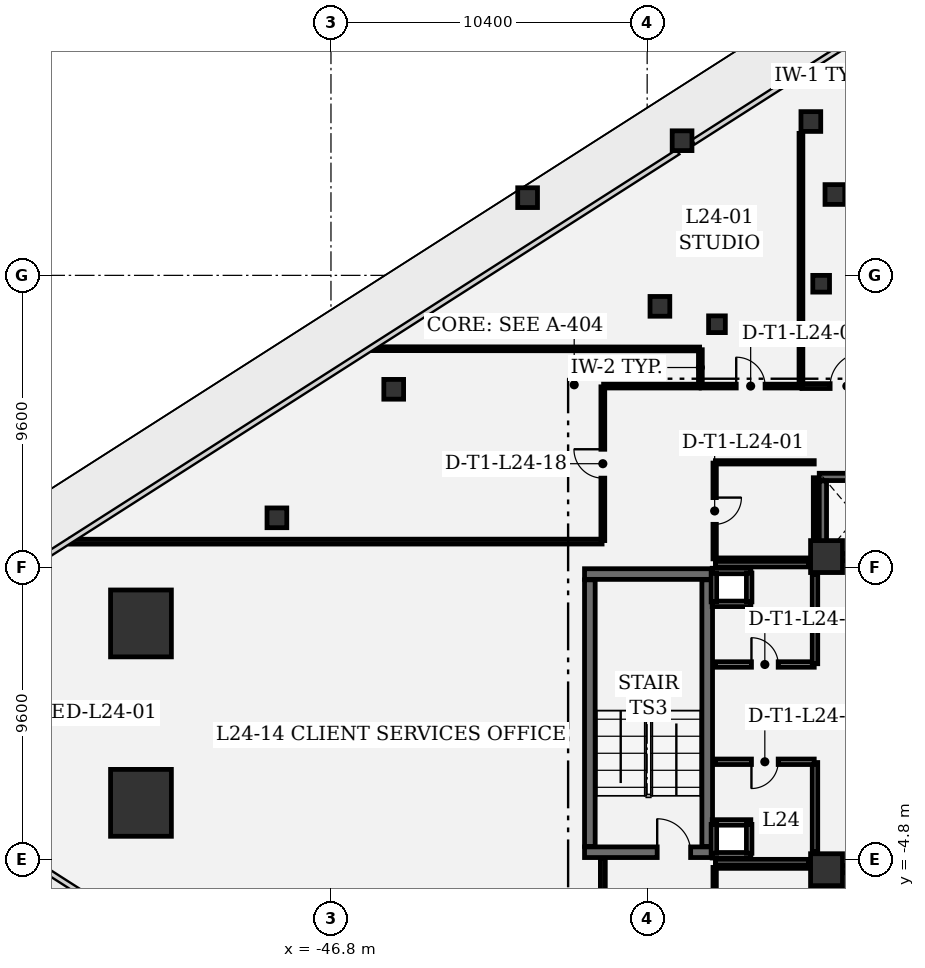
"""IFC4 building model, lengths in metres.
Left out: names, types, materials, properties, quantities, classifications, styles, units other than length and angle.
Written with IfcOpenShell. Run it as: python <this file> out.ifc"""

import sys

from ifc_helpers import new_model, si_unit, direction, frame, frame_2d, origin, origin_2d, place, context, subcontext, project, spatial, rectangle, extrude, element, fill, save


model = new_model("IFC4")
c1 = context("Model", 3, precision=1e-05, world=origin(), true_north=direction((0.0, 1.0)))
c2 = subcontext(c1, "Body", "Model", "MODEL_VIEW")
j1 = project(units=[si_unit("LENGTHUNIT", "METRE"), si_unit("PLANEANGLEUNIT", "RADIAN")], contexts=[c1])
p1 = place(None, origin())
s1 = spatial("IfcSite", under=j1, at=p1, CompositionType="ELEMENT")
p2 = place(p1, origin())
s2 = spatial("IfcBuilding", under=s1, at=p2, CompositionType="ELEMENT")
p3 = place(p2, frame((0.0, 0.0, 109.8)))
s3 = spatial("IfcBuildingStorey", under=s2, at=p3, CompositionType="ELEMENT", Elevation=109.8)
for number, where, z_axis, x_axis in (
    (1, (-53.049, 2.951, 0.0), (0.0, 0.0, 1.0), (1.0, 0.0, 0.0)),
    (2, (-53.049, -2.951, 0.0), (0.0, 0.0, 1.0), (1.0, 0.0, 0.0)),
):
    element("IfcColumn", number, at=place(p3, frame(where, z_axis=z_axis, x_axis=x_axis)), inside=s3, PredefinedType="COLUMN", context=c2, shape_type="SweptSolid", body=[
        extrude(rectangle(XDim=2.0, YDim=2.2, at=origin_2d()), origin(), (0.0, 0.0, 1.0), 4.05),
    ])
for number, where, z_axis, x_axis in (
    (3, (-30.5, 5.15, 0.0), (0.0, 0.0, 1.0), (1.0, 0.0, 0.0)),
    (4, (-30.5, -5.15, 0.0), (0.0, 0.0, 1.0), (1.0, 0.0, 0.0)),
):
    element("IfcColumn", number, at=place(p3, frame(where, z_axis=z_axis, x_axis=x_axis)), inside=s3, PredefinedType="COLUMN", context=c2, shape_type="SweptSolid", body=[
        extrude(rectangle(XDim=1.05, YDim=1.05, at=origin_2d()), origin(), (0.0, 0.0, 1.0), 4.05),
    ])
for number, where, z_axis, x_axis in (
    (5, (-40.333, 16.956, 0.0), (0.0, 0.0, 1.0), (1.0, 0.0, 0.0)),
    (6, (-35.252, 18.829, 0.0), (0.0, 0.0, 1.0), (1.0, 0.0, 0.0)),
    (7, (-31.016, 19.46, 0.0), (0.0, 0.0, 1.0), (1.0, 0.0, 0.0)),
    (8, (-44.736, 10.652, 0.0), (0.0, 0.0, 1.0), (1.0, 0.0, 0.0)),
    (9, (-48.578, 6.425, 0.0), (0.0, 0.0, 1.0), (1.0, 0.0, 0.0)),
    (10, (-35.981, 13.381, 0.0), (0.0, 0.0, 1.0), (1.0, 0.0, 0.0)),
    (11, (-30.225, 17.06, 0.0), (0.0, 0.0, 1.0), (1.0, 0.0, 0.0)),
):
    element("IfcColumn", number, at=place(p3, frame(where, z_axis=z_axis, x_axis=x_axis)), inside=s3, PredefinedType="COLUMN", context=c2, shape_type="SweptSolid", body=[
        extrude(rectangle(XDim=0.65, YDim=0.65, at=origin_2d()), origin(), (0.0, 0.0, 1.0), 4.05),
    ])
for number, where, z_axis, x_axis in (
    (12, (-34.104, 12.792, 0.0), (0.0, 0.0, 1.0), (1.0, 0.0, 0.0)),
    (13, (-30.677, 14.124, 0.0), (0.0, 0.0, 1.0), (1.0, 0.0, 0.0)),
):
    element("IfcColumn", number, at=place(p3, frame(where, z_axis=z_axis, x_axis=x_axis)), inside=s3, PredefinedType="COLUMN", context=c2, shape_type="SweptSolid", body=[
        extrude(rectangle(XDim=0.55, YDim=0.55, at=origin_2d()), origin(), (0.0, 0.0, 1.0), 4.05),
    ])
p4 = place(p3, frame((-38.46, -4.575, 0.0), z_axis=(0.0, 0.0, 1.0), x_axis=(1.0, 0.0, 0.0)))
e14 = element("IfcWall", 14, at=p4, inside=s3, PredefinedType="SHEAR", context=c2, shape_type="SweptSolid", body=[
    extrude(rectangle(XDim=4.21, YDim=0.35, at=frame_2d((2.105, 0.0))), origin(), (0.0, 0.0, 1.0), 3.77),
])
p5 = place(p4, frame((2.39, 0.0, 0.0)))
e15 = element("IfcOpeningElement", 15, at=p5, cuts=e14, PredefinedType="OPENING", context=c2, shape_type="SweptSolid", body=[
    extrude(rectangle(XDim=1.1, YDim=2.2, at=frame_2d((0.55, 1.1))), frame((0.0, 0.185, 0.0), z_axis=(0.0, -1.0, 0.0), x_axis=(1.0, 0.0, 0.0)), (0.0, 0.0, 1.0), 0.37),
])
p6 = place(p3, frame((-34.25, 4.575, 0.0), z_axis=(0.0, 0.0, 1.0), x_axis=(-1.0, 0.0, 0.0)))
e16 = element("IfcWall", 16, at=p6, inside=s3, PredefinedType="SHEAR", context=c2, shape_type="SweptSolid", body=[
    extrude(rectangle(XDim=4.21, YDim=0.35, at=frame_2d((2.105, 0.0))), origin(), (0.0, 0.0, 1.0), 3.77),
])
for number, where, z_axis, x_axis in (
    (17, (-34.425, -4.385, 0.0), (0.0, 0.0, 1.0), (0.0, 1.0, 0.0)),
    (18, (-38.285, 4.385, 0.0), (0.0, 0.0, 1.0), (0.0, -1.0, 0.0)),
):
    element("IfcWall", number, at=place(p3, frame(where, z_axis=z_axis, x_axis=x_axis)), inside=s3, PredefinedType="SHEAR", context=c2, shape_type="SweptSolid", body=[
        extrude(rectangle(XDim=8.77, YDim=0.35, at=frame_2d((4.385, 0.0))), origin(), (0.0, 0.0, 1.0), 3.77),
    ])
for number, where, z_axis, x_axis in (
    (19, (-28.26, 5.13, 0.0), (0.0, 0.0, 1.0), (-1.0, 0.0, 0.0)),
    (20, (-30.74, 7.77, 0.0), (0.0, 0.0, 1.0), (1.0, 0.0, 0.0)),
):
    element("IfcWall", number, at=place(p3, frame(where, z_axis=z_axis, x_axis=x_axis)), inside=s3, PredefinedType="SHEAR", context=c2, shape_type="SweptSolid", body=[
        extrude(rectangle(XDim=2.48, YDim=0.24, at=frame_2d((1.24, 0.0))), origin(), (0.0, 0.0, 1.0), 3.77),
    ])
p7 = place(p3, frame((-30.62, 5.262, 0.0), z_axis=(0.0, 0.0, 1.0), x_axis=(0.0, 1.0, 0.0)))
e21 = element("IfcWall", 21, at=p7, inside=s3, PredefinedType="SHEAR", context=c2, shape_type="SweptSolid", body=[
    extrude(rectangle(XDim=2.376, YDim=0.24, at=frame_2d((1.188, 0.0))), origin(), (0.0, 0.0, 1.0), 3.77),
])
p8 = place(p3, frame((-30.74, -5.13, 0.0), z_axis=(0.0, 0.0, 1.0), x_axis=(1.0, 0.0, 0.0)))
e22 = element("IfcWall", 22, at=p8, inside=s3, PredefinedType="SHEAR", context=c2, shape_type="SweptSolid", body=[
    extrude(rectangle(XDim=2.48, YDim=0.24, at=frame_2d((1.24, 0.0))), origin(), (0.0, 0.0, 1.0), 3.77),
])
p9 = place(p3, frame((-30.62, -7.638, 0.0), z_axis=(0.0, 0.0, 1.0), x_axis=(0.0, 1.0, 0.0)))
e23 = element("IfcWall", 23, at=p9, inside=s3, PredefinedType="SHEAR", context=c2, shape_type="SweptSolid", body=[
    extrude(rectangle(XDim=2.376, YDim=0.24, at=frame_2d((1.188, 0.0))), origin(), (0.0, 0.0, 1.0), 3.77),
])
for number, where, z_axis, x_axis in (
    (24, (-32.99, 3.595, 0.0), (0.0, 0.0, 1.0), (-1.0, 0.0, 0.0)),
    (25, (-34.26, 4.675, 0.0), (0.0, 0.0, 1.0), (1.0, 0.0, 0.0)),
):
    element("IfcWall", number, at=place(p3, frame(where, z_axis=z_axis, x_axis=x_axis)), inside=s3, PredefinedType="PARTITIONING", context=c2, shape_type="SweptSolid", body=[
        extrude(rectangle(XDim=1.27, YDim=0.18, at=frame_2d((0.635, 0.0))), origin(), (0.0, 0.0, 1.0), 3.77),
    ])
for number, where, z_axis, x_axis in (
    (26, (-34.205, 3.66, 0.0), (0.0, 0.0, 1.0), (0.0, 1.0, 0.0)),
    (27, (-33.045, 4.61, 0.0), (0.0, 0.0, 1.0), (0.0, -1.0, 0.0)),
):
    element("IfcWall", number, at=place(p3, frame(where, z_axis=z_axis, x_axis=x_axis)), inside=s3, PredefinedType="PARTITIONING", context=c2, shape_type="SweptSolid", body=[
        extrude(rectangle(XDim=0.95, YDim=0.18, at=frame_2d((0.475, 0.0))), origin(), (0.0, 0.0, 1.0), 3.77),
    ])
for number, where, z_axis, x_axis in (
    (28, (-32.99, -4.675, 0.0), (0.0, 0.0, 1.0), (-1.0, 0.0, 0.0)),
    (29, (-34.26, -3.595, 0.0), (0.0, 0.0, 1.0), (1.0, 0.0, 0.0)),
):
    element("IfcWall", number, at=place(p3, frame(where, z_axis=z_axis, x_axis=x_axis)), inside=s3, PredefinedType="PARTITIONING", context=c2, shape_type="SweptSolid", body=[
        extrude(rectangle(XDim=1.27, YDim=0.18, at=frame_2d((0.635, 0.0))), origin(), (0.0, 0.0, 1.0), 3.77),
    ])
for number, where, z_axis, x_axis in (
    (30, (-34.205, -4.61, 0.0), (0.0, 0.0, 1.0), (0.0, 1.0, 0.0)),
    (31, (-33.045, -3.66, 0.0), (0.0, 0.0, 1.0), (0.0, -1.0, 0.0)),
):
    element("IfcWall", number, at=place(p3, frame(where, z_axis=z_axis, x_axis=x_axis)), inside=s3, PredefinedType="PARTITIONING", context=c2, shape_type="SweptSolid", body=[
        extrude(rectangle(XDim=0.95, YDim=0.18, at=frame_2d((0.475, 0.0))), origin(), (0.0, 0.0, 1.0), 3.77),
    ])
p10 = place(p3, frame((-34.18, 8.225, 0.0), z_axis=(0.0, 0.0, 1.0), x_axis=(0.0, -1.0, 0.0)))
e32 = element("IfcWall", 32, at=p10, inside=s3, PredefinedType="PARTITIONING", context=c2, shape_type="SweptSolid", body=[
    extrude(rectangle(XDim=3.15, YDim=0.11, at=frame_2d((1.575, 0.0))), origin(), (0.0, 0.0, 1.0), 3.77),
])
p11 = place(p10, frame((1.135, 0.0, 0.0)))
e33 = element("IfcOpeningElement", 33, at=p11, cuts=e32, PredefinedType="OPENING", context=c2, shape_type="SweptSolid", body=[
    extrude(rectangle(XDim=0.88, YDim=2.1, at=frame_2d((0.44, 1.05))), frame((0.0, 0.065, 0.0), z_axis=(0.0, -1.0, 0.0), x_axis=(1.0, 0.0, 0.0)), (0.0, 0.0, 1.0), 0.13),
])
p12 = place(p3, frame((-34.155, 5.05, 0.0), z_axis=(0.0, 0.0, 1.0), x_axis=(1.0, 0.0, 0.0)))
e34 = element("IfcWall", 34, at=p12, inside=s3, PredefinedType="PARTITIONING", context=c2, shape_type="SweptSolid", body=[
    extrude(rectangle(XDim=3.065, YDim=0.11, at=frame_2d((1.532, 0.0))), origin(), (0.0, 0.0, 1.0), 3.77),
])
p13 = place(p3, frame((-30.88, 5.74, 0.0), z_axis=(0.0, 0.0, 1.0), x_axis=(0.0, 1.0, 0.0)))
e35 = element("IfcWall", 35, at=p13, inside=s3, PredefinedType="PARTITIONING", context=c2, shape_type="SweptSolid", body=[
    extrude(rectangle(XDim=2.003, YDim=0.11, at=frame_2d((1.001, 0.0))), origin(), (0.0, 0.0, 1.0), 3.77),
])
p14 = place(p3, frame((-30.905, 8.25, 0.0), z_axis=(0.0, 0.0, 1.0), x_axis=(-1.0, 0.0, 0.0)))
e36 = element("IfcWall", 36, at=p14, inside=s3, PredefinedType="PARTITIONING", context=c2, shape_type="SweptSolid", body=[
    extrude(rectangle(XDim=3.25, YDim=0.11, at=frame_2d((1.625, 0.0))), origin(), (0.0, 0.0, 1.0), 3.77),
])
p15 = place(p3, frame((-30.88, -7.743, 0.0), z_axis=(0.0, 0.0, 1.0), x_axis=(0.0, 1.0, 0.0)))
e37 = element("IfcWall", 37, at=p15, inside=s3, PredefinedType="PARTITIONING", context=c2, shape_type="SweptSolid", body=[
    extrude(rectangle(XDim=2.003, YDim=0.11, at=frame_2d((1.001, 0.0))), origin(), (0.0, 0.0, 1.0), 3.77),
])
p16 = place(p3, frame((-31.09, -5.05, 0.0), z_axis=(0.0, 0.0, 1.0), x_axis=(-1.0, 0.0, 0.0)))
e38 = element("IfcWall", 38, at=p16, inside=s3, PredefinedType="PARTITIONING", context=c2, shape_type="SweptSolid", body=[
    extrude(rectangle(XDim=3.065, YDim=0.11, at=frame_2d((1.532, 0.0))), origin(), (0.0, 0.0, 1.0), 3.77),
])
p17 = place(p3, frame((-34.18, -5.075, 0.0), z_axis=(0.0, 0.0, 1.0), x_axis=(0.0, -1.0, 0.0)))
e39 = element("IfcWall", 39, at=p17, inside=s3, PredefinedType="PARTITIONING", context=c2, shape_type="SweptSolid", body=[
    extrude(rectangle(XDim=3.25, YDim=0.11, at=frame_2d((1.625, 0.0))), origin(), (0.0, 0.0, 1.0), 3.77),
])
p18 = place(p17, frame((1.185, 0.0, 0.0)))
e40 = element("IfcOpeningElement", 40, at=p18, cuts=e39, PredefinedType="OPENING", context=c2, shape_type="SweptSolid", body=[
    extrude(rectangle(XDim=0.88, YDim=2.1, at=frame_2d((0.44, 1.05))), frame((0.0, 0.065, 0.0), z_axis=(0.0, -1.0, 0.0), x_axis=(1.0, 0.0, 0.0)), (0.0, 0.0, 1.0), 0.13),
])
p19 = place(p3, frame((-34.155, 1.6, 0.0), z_axis=(0.0, 0.0, 1.0), x_axis=(1.0, 0.0, 0.0)))
e41 = element("IfcWall", 41, at=p19, inside=s3, PredefinedType="PARTITIONING", context=c2, shape_type="SweptSolid", body=[
    extrude(rectangle(XDim=3.25, YDim=0.18, at=frame_2d((1.625, 0.0))), origin(), (0.0, 0.0, 1.0), 3.77),
])
p20 = place(p19, frame((1.185, 0.0, 0.0)))
e42 = element("IfcOpeningElement", 42, at=p20, cuts=e41, PredefinedType="OPENING", context=c2, shape_type="SweptSolid", body=[
    extrude(rectangle(XDim=0.88, YDim=2.1, at=frame_2d((0.44, 1.05))), frame((0.0, 0.1, 0.0), z_axis=(0.0, -1.0, 0.0), x_axis=(1.0, 0.0, 0.0)), (0.0, 0.0, 1.0), 0.2),
])
p21 = place(p3, frame((-30.88, 1.625, 0.0), z_axis=(0.0, 0.0, 1.0), x_axis=(0.0, 1.0, 0.0)))
e43 = element("IfcWall", 43, at=p21, inside=s3, PredefinedType="PARTITIONING", context=c2, shape_type="SweptSolid", body=[
    extrude(rectangle(XDim=2.935, YDim=0.18, at=frame_2d((1.468, 0.0))), origin(), (0.0, 0.0, 1.0), 3.77),
])
for number, where, z_axis, x_axis in (
    (44, (-31.09, 4.9, 0.0), (0.0, 0.0, 1.0), (-1.0, 0.0, 0.0)),
    (45, (-34.155, -4.9, 0.0), (0.0, 0.0, 1.0), (1.0, 0.0, 0.0)),
):
    element("IfcWall", number, at=place(p3, frame(where, z_axis=z_axis, x_axis=x_axis)), inside=s3, PredefinedType="PARTITIONING", context=c2, shape_type="SweptSolid", body=[
        extrude(rectangle(XDim=3.065, YDim=0.18, at=frame_2d((1.532, 0.0))), origin(), (0.0, 0.0, 1.0), 3.77),
    ])
p22 = place(p3, frame((-30.88, -4.56, 0.0), z_axis=(0.0, 0.0, 1.0), x_axis=(0.0, 1.0, 0.0)))
e46 = element("IfcWall", 46, at=p22, inside=s3, PredefinedType="PARTITIONING", context=c2, shape_type="SweptSolid", body=[
    extrude(rectangle(XDim=2.935, YDim=0.18, at=frame_2d((1.468, 0.0))), origin(), (0.0, 0.0, 1.0), 3.77),
])
p23 = place(p3, frame((-30.905, -1.6, 0.0), z_axis=(0.0, 0.0, 1.0), x_axis=(-1.0, 0.0, 0.0)))
e47 = element("IfcWall", 47, at=p23, inside=s3, PredefinedType="PARTITIONING", context=c2, shape_type="SweptSolid", body=[
    extrude(rectangle(XDim=3.25, YDim=0.18, at=frame_2d((1.625, 0.0))), origin(), (0.0, 0.0, 1.0), 3.77),
])
p24 = place(p23, frame((1.185, 0.0, 0.0)))
e48 = element("IfcOpeningElement", 48, at=p24, cuts=e47, PredefinedType="OPENING", context=c2, shape_type="SweptSolid", body=[
    extrude(rectangle(XDim=0.88, YDim=2.1, at=frame_2d((0.44, 1.05))), frame((0.0, 0.1, 0.0), z_axis=(0.0, -1.0, 0.0), x_axis=(1.0, 0.0, 0.0)), (0.0, 0.0, 1.0), 0.2),
])
p25 = place(p3, frame((-34.65, 10.783, 0.0), z_axis=(0.0, 0.0, 1.0), x_axis=(0.0, 1.0, 0.0)))
e49 = element("IfcWall", 49, at=p25, inside=s3, PredefinedType="PARTITIONING", context=c2, shape_type="SweptSolid", body=[
    extrude(rectangle(XDim=1.171, YDim=0.125, at=frame_2d((0.585, 0.0))), origin(), (0.0, 0.0, 1.0), 3.77),
])
p26 = place(p3, frame((-34.625, 10.758, 0.0), z_axis=(0.0, 0.0, 1.0), x_axis=(1.0, 0.0, 0.0)))
e50 = element("IfcWall", 50, at=p26, inside=s3, PredefinedType="PARTITIONING", context=c2, shape_type="SweptSolid", body=[
    extrude(rectangle(XDim=3.258, YDim=0.125, at=frame_2d((1.629, 0.0))), origin(), (0.0, 0.0, 1.0), 3.334),
])
p27 = place(p26, frame((1.154, 0.0, 0.0)))
e51 = element("IfcOpeningElement", 51, at=p27, cuts=e50, PredefinedType="OPENING", context=c2, shape_type="SweptSolid", body=[
    extrude(rectangle(XDim=0.95, YDim=2.15, at=frame_2d((0.475, 1.075))), frame((0.0, 0.073, 0.0), z_axis=(0.0, -1.0, 0.0), x_axis=(1.0, 0.0, 0.0)), (0.0, 0.0, 1.0), 0.145),
])
p28 = place(p3, frame((-31.342, 10.783, 0.0), z_axis=(0.0, 0.0, 1.0), x_axis=(0.0, 1.0, 0.0)))
e52 = element("IfcWall", 52, at=p28, inside=s3, PredefinedType="PARTITIONING", context=c2, shape_type="SweptSolid", body=[
    extrude(rectangle(XDim=8.287, YDim=0.125, at=frame_2d((4.144, 0.0))), origin(), (0.0, 0.0, 1.0), 3.77),
])
p29 = place(p3, frame((-45.432, 11.988, 0.0), z_axis=(0.0, 0.0, 1.0), x_axis=(0.999999628081, -0.000862459961, 0.0)))
e53 = element("IfcWall", 53, at=p29, inside=s3, PredefinedType="PARTITIONING", context=c2, shape_type="SweptSolid", body=[
    extrude(rectangle(XDim=10.757, YDim=0.125, at=frame_2d((5.378, 0.0))), origin(), (0.0, 0.0, 1.0), 2.89),
])
p30 = place(p3, frame((-31.309, 10.758, 0.0), z_axis=(0.0, 0.0, 1.0), x_axis=(1.0, 0.0, 0.0)))
e54 = element("IfcWall", 54, at=p30, inside=s3, PredefinedType="PARTITIONING", context=c2, shape_type="SweptSolid", body=[
    extrude(rectangle(XDim=2.952, YDim=0.16, at=frame_2d((1.476, 0.0))), origin(), (0.0, 0.0, 1.0), 3.77),
])
p31 = place(p30, frame((0.926, 0.0, 0.0)))
e55 = element("IfcOpeningElement", 55, at=p31, cuts=e54, PredefinedType="OPENING", context=c2, shape_type="SweptSolid", body=[
    extrude(rectangle(XDim=1.1, YDim=2.15, at=frame_2d((0.55, 1.075))), frame((0.0, 0.09, 0.0), z_axis=(0.0, -1.0, 0.0), x_axis=(1.0, 0.0, 0.0)), (0.0, 0.0, 1.0), 0.18),
])
p32 = place(p3, frame((-37.858, -10.576, 0.0), z_axis=(0.0, 0.0, 1.0), x_axis=(0.0, 1.0, 0.0)))
e56 = element("IfcWall", 56, at=p32, inside=s3, PredefinedType="PARTITIONING", context=c2, shape_type="SweptSolid", body=[
    extrude(rectangle(XDim=5.792, YDim=0.16, at=frame_2d((2.896, 0.0))), origin(), (0.0, 0.0, 1.0), 3.77),
])
p33 = place(p32, frame((2.346, 0.0, 0.0)))
e57 = element("IfcOpeningElement", 57, at=p33, cuts=e56, PredefinedType="OPENING", context=c2, shape_type="SweptSolid", body=[
    extrude(rectangle(XDim=1.1, YDim=2.15, at=frame_2d((0.55, 1.075))), frame((0.0, 0.09, 0.0), z_axis=(0.0, -1.0, 0.0), x_axis=(1.0, 0.0, 0.0)), (0.0, 0.0, 1.0), 0.18),
])
p34 = place(p3, frame((-37.883, 5.643, 0.0), z_axis=(0.0, 0.0, 1.0), x_axis=(-0.99999998352, -0.000181549029, 0.0)))
e58 = element("IfcWall", 58, at=p34, inside=s3, PredefinedType="PARTITIONING", context=c2, shape_type="SweptSolid", body=[
    extrude(rectangle(XDim=17.482, YDim=0.16, at=frame_2d((8.741, 0.0))), origin(), (0.0, 0.0, 1.0), 2.89),
])
p35 = place(p3, frame((-37.858, 5.676, 0.0), z_axis=(0.0, 0.0, 1.0), x_axis=(0.0, 1.0, 0.0)))
e59 = element("IfcWall", 59, at=p35, inside=s3, PredefinedType="PARTITIONING", context=c2, shape_type="SweptSolid", body=[
    extrude(rectangle(XDim=5.057, YDim=0.125, at=frame_2d((2.529, 0.0))), origin(), (0.0, 0.0, 1.0), 3.77),
])
p36 = place(p35, frame((2.054, 0.0, 0.0)))
e60 = element("IfcOpeningElement", 60, at=p36, cuts=e59, PredefinedType="OPENING", context=c2, shape_type="SweptSolid", body=[
    extrude(rectangle(XDim=0.95, YDim=2.15, at=frame_2d((0.475, 1.075))), frame((0.0, 0.073, 0.0), z_axis=(0.0, -1.0, 0.0), x_axis=(1.0, 0.0, 0.0)), (0.0, 0.0, 1.0), 0.145),
])
p37 = place(p3, frame((-34.683, 10.758, 0.0), z_axis=(0.0, 0.0, 1.0), x_axis=(-1.0, 0.0, 0.0)))
e61 = element("IfcWall", 61, at=p37, inside=s3, PredefinedType="PARTITIONING", context=c2, shape_type="SweptSolid", body=[
    extrude(rectangle(XDim=3.15, YDim=0.125, at=frame_2d((1.575, 0.0))), origin(), (0.0, 0.0, 1.0), 3.334),
])
p38 = place(p5, origin())
e62 = element("IfcDoor", 62, at=p38, inside=s3, OperationType="SINGLE_SWING_LEFT", PredefinedType="DOOR", context=c2, shape_type="SweptSolid", body=[
    extrude(rectangle(XDim=1.1, YDim=2.2, at=frame_2d((0.55, 1.1))), frame((0.0, 0.025, 0.0), z_axis=(0.0, -1.0, 0.0), x_axis=(1.0, 0.0, 0.0)), (0.0, 0.0, 1.0), 0.05),
])
fill(e15, e62)
p39 = place(p11, origin())
e63 = element("IfcDoor", 63, at=p39, inside=s3, OperationType="SINGLE_SWING_LEFT", PredefinedType="DOOR", context=c2, shape_type="SweptSolid", body=[
    extrude(rectangle(XDim=0.88, YDim=2.1, at=frame_2d((0.44, 1.05))), frame((0.0, 0.025, 0.0), z_axis=(0.0, -1.0, 0.0), x_axis=(1.0, 0.0, 0.0)), (0.0, 0.0, 1.0), 0.05),
])
fill(e33, e63)
p40 = place(p20, origin())
e64 = element("IfcDoor", 64, at=p40, inside=s3, OperationType="SINGLE_SWING_LEFT", PredefinedType="DOOR", context=c2, shape_type="SweptSolid", body=[
    extrude(rectangle(XDim=0.88, YDim=2.1, at=frame_2d((0.44, 1.05))), frame((0.0, 0.025, 0.0), z_axis=(0.0, -1.0, 0.0), x_axis=(1.0, 0.0, 0.0)), (0.0, 0.0, 1.0), 0.05),
])
fill(e42, e64)
p41 = place(p24, origin())
e65 = element("IfcDoor", 65, at=p41, inside=s3, OperationType="SINGLE_SWING_RIGHT", PredefinedType="DOOR", context=c2, shape_type="SweptSolid", body=[
    extrude(rectangle(XDim=0.88, YDim=2.1, at=frame_2d((0.44, 1.05))), frame((0.0, 0.025, 0.0), z_axis=(0.0, -1.0, 0.0), x_axis=(1.0, 0.0, 0.0)), (0.0, 0.0, 1.0), 0.05),
])
fill(e48, e65)
p42 = place(p27, origin())
e66 = element("IfcDoor", 66, at=p42, inside=s3, OperationType="SINGLE_SWING_LEFT", PredefinedType="DOOR", context=c2, shape_type="SweptSolid", body=[
    extrude(rectangle(XDim=0.95, YDim=2.15, at=frame_2d((0.475, 1.075))), frame((0.0, 0.025, 0.0), z_axis=(0.0, -1.0, 0.0), x_axis=(1.0, 0.0, 0.0)), (0.0, 0.0, 1.0), 0.05),
])
fill(e51, e66)
p43 = place(p31, origin())
e67 = element("IfcDoor", 67, at=p43, inside=s3, OperationType="SINGLE_SWING_RIGHT", PredefinedType="DOOR", context=c2, shape_type="SweptSolid", body=[
    extrude(rectangle(XDim=1.1, YDim=2.15, at=frame_2d((0.55, 1.075))), frame((0.0, 0.025, 0.0), z_axis=(0.0, -1.0, 0.0), x_axis=(1.0, 0.0, 0.0)), (0.0, 0.0, 1.0), 0.05),
])
fill(e55, e67)
p44 = place(p36, origin())
e68 = element("IfcDoor", 68, at=p44, inside=s3, OperationType="SINGLE_SWING_RIGHT", PredefinedType="DOOR", context=c2, shape_type="SweptSolid", body=[
    extrude(rectangle(XDim=0.95, YDim=2.15, at=frame_2d((0.475, 1.075))), frame((0.0, 0.025, 0.0), z_axis=(0.0, -1.0, 0.0), x_axis=(1.0, 0.0, 0.0)), (0.0, 0.0, 1.0), 0.05),
])
fill(e60, e68)
save(model, sys.argv[1])
